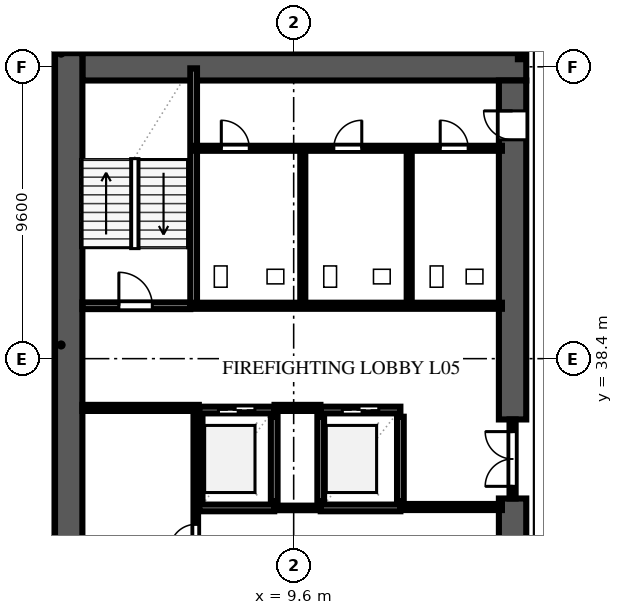
"""IFC4 building model, lengths in metres.
Left out: names, types, materials, properties, quantities, classifications, styles, units other than length and angle.
Written with IfcOpenShell. Run it as: python <this file> out.ifc"""

import sys

from ifc_helpers import new_model, si_unit, direction, frame, frame_2d, origin, place, context, subcontext, project, spatial, rectangle, extrude, element, fill, save


model = new_model("IFC4")
c1 = context("Model", 3, precision=1e-05, world=origin(), true_north=direction((0.0, 1.0)))
c2 = subcontext(c1, "Body", "Model", "MODEL_VIEW")
j1 = project(units=[si_unit("LENGTHUNIT", "METRE"), si_unit("PLANEANGLEUNIT", "RADIAN")], contexts=[c1])
p1 = place(None, origin())
s1 = spatial("IfcSite", under=j1, at=p1, CompositionType="ELEMENT")
p2 = place(p1, origin())
s2 = spatial("IfcBuilding", under=s1, at=p2, CompositionType="ELEMENT")
p3 = place(p2, frame((0.0, 0.0, 24.2)))
s3 = spatial("IfcBuildingStorey", under=s2, at=p3, CompositionType="ELEMENT", Elevation=24.2)
p4 = place(p3, frame((2.65, 48.0, 0.0), z_axis=(0.0, 0.0, 1.0), x_axis=(1.0, 0.0, 0.0)))
e1 = element("IfcWall", 1, at=p4, inside=s3, PredefinedType="SHEAR", context=c2, shape_type="SweptSolid", body=[
    extrude(rectangle(XDim=14.6, YDim=0.9, at=frame_2d((7.3, 0.0))), origin(), (0.0, 0.0, 1.0), 3.54),
])
p5 = place(p3, frame((2.2, 9.15, 0.0), z_axis=(0.0, 0.0, 1.0), x_axis=(0.0, 1.0, 0.0)))
e2 = element("IfcWall", 2, at=p5, inside=s3, PredefinedType="SHEAR", context=c2, shape_type="SweptSolid", body=[
    extrude(rectangle(XDim=39.3, YDim=0.9, at=frame_2d((19.65, 0.0))), origin(), (0.0, 0.0, 1.0), 3.54),
])
p6 = place(p3, frame((16.8, 26.0, 0.0), z_axis=(0.0, 0.0, 1.0), x_axis=(0.0, 1.0, 0.0)))
e3 = element("IfcWall", 3, at=p6, inside=s3, PredefinedType="SHEAR", context=c2, shape_type="SweptSolid", body=[
    extrude(rectangle(XDim=7.8, YDim=0.9, at=frame_2d((3.9, 0.0))), origin(), (0.0, 0.0, 1.0), 3.54),
])
p7 = place(p3, frame((16.8, 36.4, 0.0), z_axis=(0.0, 0.0, 1.0), x_axis=(0.0, 1.0, 0.0)))
e4 = element("IfcWall", 4, at=p7, inside=s3, PredefinedType="SHEAR", context=c2, shape_type="SweptSolid", body=[
    extrude(rectangle(XDim=11.15, YDim=0.9, at=frame_2d((5.575, 0.0))), origin(), (0.0, 0.0, 1.0), 3.54),
])
p8 = place(p7, frame((9.2, 0.0, 0.0)))
e5 = element("IfcOpeningElement", 5, at=p8, cuts=e4, PredefinedType="OPENING", context=c2, shape_type="SweptSolid", body=[
    extrude(rectangle(XDim=0.95, YDim=2.15, at=frame_2d((0.475, 1.075))), frame((0.0, 0.462, 0.0), z_axis=(0.0, -1.0, 0.0), x_axis=(1.0, 0.0, 0.0)), (0.0, 0.0, 1.0), 0.924),
])
p9 = place(p3, frame((2.65, 40.14, 0.0), z_axis=(0.0, 0.0, 1.0), x_axis=(1.0, 0.0, 0.0)))
e6 = element("IfcWall", 6, at=p9, inside=s3, PredefinedType="SOLIDWALL", context=c2, shape_type="SweptSolid", body=[
    extrude(rectangle(XDim=3.55, YDim=0.22, at=frame_2d((1.775, 0.0))), origin(), (0.0, 0.0, 1.0), 3.54),
])
p10 = place(p9, frame((1.2, 0.0, 0.0)))
e7 = element("IfcOpeningElement", 7, at=p10, cuts=e6, PredefinedType="OPENING", context=c2, shape_type="SweptSolid", body=[
    extrude(rectangle(XDim=1.1, YDim=2.2, at=frame_2d((0.55, 1.1))), frame((0.0, 0.122, 0.0), z_axis=(0.0, -1.0, 0.0), x_axis=(1.0, 0.0, 0.0)), (0.0, 0.0, 1.0), 0.244),
])
p11 = place(p3, frame((6.31, 40.14, 0.0), z_axis=(0.0, 0.0, 1.0), x_axis=(0.0, 1.0, 0.0)))
e8 = element("IfcWall", 8, at=p11, inside=s3, PredefinedType="SOLIDWALL", context=c2, shape_type="SweptSolid", body=[
    extrude(rectangle(XDim=7.81, YDim=0.22, at=frame_2d((3.905, 0.0))), origin(), (0.0, 0.0, 1.0), 3.54),
])
for number, where, z_axis, x_axis in (
    (9, (6.49, 33.71, 0.0), (0.0, 0.0, 1.0), (0.0, 1.0, 0.0)),
    (10, (8.96, 33.71, 0.0), (0.0, 0.0, 1.0), (0.0, 1.0, 0.0)),
):
    element("IfcWall", number, at=place(p3, frame(where, z_axis=z_axis, x_axis=x_axis)), inside=s3, PredefinedType="SOLIDWALL", context=c2, shape_type="SweptSolid", body=[
        extrude(rectangle(XDim=2.78, YDim=0.22, at=frame_2d((1.39, 0.0))), origin(), (0.0, 0.0, 1.0), 3.54),
    ])
p12 = place(p3, frame((6.49, 33.49, 0.0), z_axis=(0.0, 0.0, 1.0), x_axis=(1.0, 0.0, 0.0)))
e11 = element("IfcWall", 11, at=p12, inside=s3, PredefinedType="SOLIDWALL", context=c2, shape_type="SweptSolid", body=[
    extrude(rectangle(XDim=2.47, YDim=0.22, at=frame_2d((1.235, 0.0))), origin(), (0.0, 0.0, 1.0), 3.54),
])
p13 = place(p3, frame((6.49, 36.71, 0.0), z_axis=(0.0, 0.0, 1.0), x_axis=(1.0, 0.0, 0.0)))
e12 = element("IfcWall", 12, at=p13, inside=s3, PredefinedType="SOLIDWALL", context=c2, shape_type="SweptSolid", body=[
    extrude(rectangle(XDim=2.47, YDim=0.22, at=frame_2d((1.235, 0.0))), origin(), (0.0, 0.0, 1.0), 3.54),
])
p14 = place(p13, frame((0.635, 0.0, 0.0)))
e13 = element("IfcOpeningElement", 13, at=p14, cuts=e12, PredefinedType="OPENING", context=c2, shape_type="SweptSolid", body=[
    extrude(rectangle(XDim=1.2, YDim=2.2, at=frame_2d((0.6, 1.1))), frame((0.0, 0.122, 0.0), z_axis=(0.0, -1.0, 0.0), x_axis=(1.0, 0.0, 0.0)), (0.0, 0.0, 1.0), 0.244),
])
for number, where, z_axis, x_axis in (
    (14, (10.49, 33.71, 0.0), (0.0, 0.0, 1.0), (0.0, 1.0, 0.0)),
    (15, (13.11, 33.71, 0.0), (0.0, 0.0, 1.0), (0.0, 1.0, 0.0)),
):
    element("IfcWall", number, at=place(p3, frame(where, z_axis=z_axis, x_axis=x_axis)), inside=s3, PredefinedType="SOLIDWALL", context=c2, shape_type="SweptSolid", body=[
        extrude(rectangle(XDim=2.78, YDim=0.22, at=frame_2d((1.39, 0.0))), origin(), (0.0, 0.0, 1.0), 3.54),
    ])
p15 = place(p3, frame((10.49, 33.49, 0.0), z_axis=(0.0, 0.0, 1.0), x_axis=(1.0, 0.0, 0.0)))
e16 = element("IfcWall", 16, at=p15, inside=s3, PredefinedType="SOLIDWALL", context=c2, shape_type="SweptSolid", body=[
    extrude(rectangle(XDim=2.62, YDim=0.22, at=frame_2d((1.31, 0.0))), origin(), (0.0, 0.0, 1.0), 3.54),
])
p16 = place(p3, frame((10.49, 36.71, 0.0), z_axis=(0.0, 0.0, 1.0), x_axis=(1.0, 0.0, 0.0)))
e17 = element("IfcWall", 17, at=p16, inside=s3, PredefinedType="SOLIDWALL", context=c2, shape_type="SweptSolid", body=[
    extrude(rectangle(XDim=2.62, YDim=0.22, at=frame_2d((1.31, 0.0))), origin(), (0.0, 0.0, 1.0), 3.54),
])
p17 = place(p16, frame((0.71, 0.0, 0.0)))
e18 = element("IfcOpeningElement", 18, at=p17, cuts=e17, PredefinedType="OPENING", context=c2, shape_type="SweptSolid", body=[
    extrude(rectangle(XDim=1.2, YDim=2.2, at=frame_2d((0.6, 1.1))), frame((0.0, 0.122, 0.0), z_axis=(0.0, -1.0, 0.0), x_axis=(1.0, 0.0, 0.0)), (0.0, 0.0, 1.0), 0.244),
])
p18 = place(p3, frame((2.65, 36.78, 0.0), z_axis=(0.0, 0.0, 1.0), x_axis=(1.0, 0.0, 0.0)))
e19 = element("IfcWall", 19, at=p18, inside=s3, PredefinedType="SOLIDWALL", context=c2, shape_type="SweptSolid", body=[
    extrude(rectangle(XDim=3.83, YDim=0.2, at=frame_2d((1.915, 0.0))), origin(), (0.0, 0.0, 1.0), 3.54),
])
p19 = place(p3, frame((8.97, 36.78, 0.0), z_axis=(0.0, 0.0, 1.0), x_axis=(1.0, 0.0, 0.0)))
e20 = element("IfcWall", 20, at=p19, inside=s3, PredefinedType="SOLIDWALL", context=c2, shape_type="SweptSolid", body=[
    extrude(rectangle(XDim=1.51, YDim=0.2, at=frame_2d((0.755, 0.0))), origin(), (0.0, 0.0, 1.0), 3.54),
])
p20 = place(p3, frame((13.12, 33.52, 0.0), z_axis=(0.0, 0.0, 1.0), x_axis=(1.0, 0.0, 0.0)))
e21 = element("IfcWall", 21, at=p20, inside=s3, PredefinedType="SOLIDWALL", context=c2, shape_type="SweptSolid", body=[
    extrude(rectangle(XDim=3.33, YDim=0.2, at=frame_2d((1.665, 0.0))), origin(), (0.0, 0.0, 1.0), 3.54),
])
p21 = place(p3, frame((6.32, 40.14, 0.0), z_axis=(0.0, 0.0, 1.0), x_axis=(1.0, 0.0, 0.0)))
e22 = element("IfcWall", 22, at=p21, inside=s3, PredefinedType="SOLIDWALL", context=c2, shape_type="SweptSolid", body=[
    extrude(rectangle(XDim=10.13, YDim=0.2, at=frame_2d((5.065, 0.0))), origin(), (0.0, 0.0, 1.0), 3.54),
])
p22 = place(p3, frame((16.8, 33.8, 0.0), z_axis=(0.0, 0.0, 1.0), x_axis=(0.0, 1.0, 0.0)))
e23 = element("IfcWall", 23, at=p22, inside=s3, PredefinedType="SOLIDWALL", context=c2, shape_type="SweptSolid", body=[
    extrude(rectangle(XDim=2.6, YDim=0.2, at=frame_2d((1.3, 0.0))), origin(), (0.0, 0.0, 1.0), 3.54),
])
p23 = place(p22, frame((0.4, 0.0, 0.0)))
e24 = element("IfcOpeningElement", 24, at=p23, cuts=e23, PredefinedType="OPENING", context=c2, shape_type="SweptSolid", body=[
    extrude(rectangle(XDim=1.8, YDim=2.2, at=frame_2d((0.9, 1.1))), frame((0.0, 0.112, 0.0), z_axis=(0.0, -1.0, 0.0), x_axis=(1.0, 0.0, 0.0)), (0.0, 0.0, 1.0), 0.224),
])
p24 = place(p3, frame((8.965, 33.49, 0.0), z_axis=(0.0, 0.0, 1.0), x_axis=(1.0, 0.0, 0.0)))
e25 = element("IfcWall", 25, at=p24, inside=s3, PredefinedType="PARTITIONING", context=c2, shape_type="SweptSolid", body=[
    extrude(rectangle(XDim=1.52, YDim=0.15, at=frame_2d((0.76, 0.0))), origin(), (0.0, 0.0, 1.0), 3.54),
])
p25 = place(p3, frame((6.38, 17.8, 0.0), z_axis=(0.0, 0.0, 1.0), x_axis=(0.0, 1.0, 0.0)))
e26 = element("IfcWall", 26, at=p25, inside=s3, PredefinedType="PARTITIONING", context=c2, shape_type="SweptSolid", body=[
    extrude(rectangle(XDim=18.98, YDim=0.15, at=frame_2d((9.49, 0.0))), origin(), (0.0, 0.0, 1.0), 3.54),
])
p26 = place(p25, frame((14.3, 0.0, 0.0)))
e27 = element("IfcOpeningElement", 27, at=p26, cuts=e26, PredefinedType="OPENING", context=c2, shape_type="SweptSolid", body=[
    extrude(rectangle(XDim=0.85, YDim=2.1, at=frame_2d((0.425, 1.05))), frame((0.0, 0.087, 0.0), z_axis=(0.0, -1.0, 0.0), x_axis=(1.0, 0.0, 0.0)), (0.0, 0.0, 1.0), 0.174),
])
p27 = place(p3, frame((6.32, 45.32, 0.0), z_axis=(0.0, 0.0, 1.0), x_axis=(1.0, 0.0, 0.0)))
e28 = element("IfcWall", 28, at=p27, inside=s3, PredefinedType="PLUMBINGWALL", context=c2, shape_type="SweptSolid", body=[
    extrude(rectangle(XDim=10.13, YDim=0.165, at=frame_2d((5.065, 0.0))), origin(), (0.0, 0.0, 1.0), 3.54),
])
p28 = place(p27, frame((0.9, 0.0, 0.0)))
e29 = element("IfcOpeningElement", 29, at=p28, cuts=e28, PredefinedType="OPENING", context=c2, shape_type="SweptSolid", body=[
    extrude(rectangle(XDim=0.92, YDim=2.15, at=frame_2d((0.46, 1.075))), frame((0.0, 0.094, 0.0), z_axis=(0.0, -1.0, 0.0), x_axis=(1.0, 0.0, 0.0)), (0.0, 0.0, 1.0), 0.189),
])
p29 = place(p27, frame((4.6, 0.0, 0.0)))
e30 = element("IfcOpeningElement", 30, at=p29, cuts=e28, PredefinedType="OPENING", context=c2, shape_type="SweptSolid", body=[
    extrude(rectangle(XDim=0.92, YDim=2.15, at=frame_2d((0.46, 1.075))), frame((0.0, 0.094, 0.0), z_axis=(0.0, -1.0, 0.0), x_axis=(1.0, 0.0, 0.0)), (0.0, 0.0, 1.0), 0.189),
])
p30 = place(p27, frame((8.1, 0.0, 0.0)))
e31 = element("IfcOpeningElement", 31, at=p30, cuts=e28, PredefinedType="OPENING", context=c2, shape_type="SweptSolid", body=[
    extrude(rectangle(XDim=0.92, YDim=2.15, at=frame_2d((0.46, 1.075))), frame((0.0, 0.094, 0.0), z_axis=(0.0, -1.0, 0.0), x_axis=(1.0, 0.0, 0.0)), (0.0, 0.0, 1.0), 0.189),
])
for number, where, z_axis, x_axis in (
    (32, (9.9, 40.4, 0.0), (0.0, 0.0, 1.0), (0.0, 1.0, 0.0)),
    (33, (13.4, 40.4, 0.0), (0.0, 0.0, 1.0), (0.0, 1.0, 0.0)),
):
    element("IfcWall", number, at=place(p3, frame(where, z_axis=z_axis, x_axis=x_axis)), inside=s3, PredefinedType="PLUMBINGWALL", context=c2, shape_type="SweptSolid", body=[
        extrude(rectangle(XDim=4.92, YDim=0.165, at=frame_2d((2.46, 0.0))), origin(), (0.0, 0.0, 1.0), 3.54),
    ])
p31 = place(p3, frame((0.85, 48.0, 0.0), z_axis=(0.0, 0.0, 1.0), x_axis=(1.0, 0.0, 0.0)))
e34 = element("IfcWall", 34, at=p31, inside=s3, PredefinedType="SOLIDWALL", context=c2, shape_type="SweptSolid", body=[
    extrude(rectangle(XDim=0.895, YDim=0.2, at=frame_2d((0.448, 0.0))), origin(), (0.0, 0.0, 1.0), 3.54),
])
p32 = place(p3, frame((17.05, 48.25, 0.0), z_axis=(0.0, 0.0, 1.0), x_axis=(0.0, 1.0, 0.0)))
e35 = element("IfcWall", 35, at=p32, inside=s3, PredefinedType="PARTITIONING", context=c2, shape_type="SweptSolid", body=[
    extrude(rectangle(XDim=18.73, YDim=0.15, at=frame_2d((9.365, 0.0))), origin(), (0.0, 0.0, 1.0), 3.54),
])
p33 = place(p32, frame((3.4, 0.0, 0.0)))
e36 = element("IfcOpeningElement", 36, at=p33, cuts=e35, PredefinedType="OPENING", context=c2, shape_type="SweptSolid", body=[
    extrude(rectangle(XDim=0.95, YDim=2.15, at=frame_2d((0.475, 1.075))), frame((0.0, 0.087, 0.0), z_axis=(0.0, -1.0, 0.0), x_axis=(1.0, 0.0, 0.0)), (0.0, 0.0, 1.0), 0.174),
])
p34 = place(p10, origin())
e37 = element("IfcDoor", 37, at=p34, inside=s3, OperationType="SINGLE_SWING_LEFT", PredefinedType="DOOR", context=c2, shape_type="SweptSolid", body=[
    extrude(rectangle(XDim=1.1, YDim=2.2, at=frame_2d((0.55, 1.1))), frame((0.0, 0.025, 0.0), z_axis=(0.0, -1.0, 0.0), x_axis=(1.0, 0.0, 0.0)), (0.0, 0.0, 1.0), 0.05),
])
fill(e7, e37)
p35 = place(p14, origin())
e38 = element("IfcDoor", 38, at=p35, inside=s3, OperationType="DOUBLE_DOOR_SLIDING", PredefinedType="DOOR", context=c2, shape_type="SweptSolid", body=[
    extrude(rectangle(XDim=1.2, YDim=2.2, at=frame_2d((0.6, 1.1))), frame((0.0, 0.025, 0.0), z_axis=(0.0, -1.0, 0.0), x_axis=(1.0, 0.0, 0.0)), (0.0, 0.0, 1.0), 0.05),
])
fill(e13, e38)
p36 = place(p17, origin())
e39 = element("IfcDoor", 39, at=p36, inside=s3, OperationType="DOUBLE_DOOR_SLIDING", PredefinedType="DOOR", context=c2, shape_type="SweptSolid", body=[
    extrude(rectangle(XDim=1.2, YDim=2.2, at=frame_2d((0.6, 1.1))), frame((0.0, 0.025, 0.0), z_axis=(0.0, -1.0, 0.0), x_axis=(1.0, 0.0, 0.0)), (0.0, 0.0, 1.0), 0.05),
])
fill(e18, e39)
p37 = place(p8, origin())
e40 = element("IfcDoor", 40, at=p37, inside=s3, OperationType="SINGLE_SWING_RIGHT", PredefinedType="DOOR", context=c2, shape_type="SweptSolid", body=[
    extrude(rectangle(XDim=0.95, YDim=2.15, at=frame_2d((0.475, 1.075))), frame((0.0, 0.025, 0.0), z_axis=(0.0, -1.0, 0.0), x_axis=(1.0, 0.0, 0.0)), (0.0, 0.0, 1.0), 0.05),
])
fill(e5, e40)
p38 = place(p23, origin())
e41 = element("IfcDoor", 41, at=p38, inside=s3, OperationType="DOUBLE_DOOR_SINGLE_SWING", PredefinedType="DOOR", context=c2, shape_type="SweptSolid", body=[
    extrude(rectangle(XDim=1.8, YDim=2.2, at=frame_2d((0.9, 1.1))), frame((0.0, 0.025, 0.0), z_axis=(0.0, -1.0, 0.0), x_axis=(1.0, 0.0, 0.0)), (0.0, 0.0, 1.0), 0.05),
])
fill(e24, e41)
p39 = place(p26, origin())
e42 = element("IfcDoor", 42, at=p39, inside=s3, OperationType="SINGLE_SWING_LEFT", PredefinedType="DOOR", context=c2, shape_type="SweptSolid", body=[
    extrude(rectangle(XDim=0.85, YDim=2.1, at=frame_2d((0.425, 1.05))), frame((0.0, 0.025, 0.0), z_axis=(0.0, -1.0, 0.0), x_axis=(1.0, 0.0, 0.0)), (0.0, 0.0, 1.0), 0.05),
])
fill(e27, e42)
p40 = place(p28, origin())
e43 = element("IfcDoor", 43, at=p40, inside=s3, OperationType="SINGLE_SWING_LEFT", PredefinedType="DOOR", context=c2, shape_type="SweptSolid", body=[
    extrude(rectangle(XDim=0.92, YDim=2.15, at=frame_2d((0.46, 1.075))), frame((0.0, 0.025, 0.0), z_axis=(0.0, -1.0, 0.0), x_axis=(1.0, 0.0, 0.0)), (0.0, 0.0, 1.0), 0.05),
])
fill(e29, e43)
p41 = place(p29, origin())
e44 = element("IfcDoor", 44, at=p41, inside=s3, OperationType="SINGLE_SWING_RIGHT", PredefinedType="DOOR", context=c2, shape_type="SweptSolid", body=[
    extrude(rectangle(XDim=0.92, YDim=2.15, at=frame_2d((0.46, 1.075))), frame((0.0, 0.025, 0.0), z_axis=(0.0, -1.0, 0.0), x_axis=(1.0, 0.0, 0.0)), (0.0, 0.0, 1.0), 0.05),
])
fill(e30, e44)
p42 = place(p30, origin())
e45 = element("IfcDoor", 45, at=p42, inside=s3, OperationType="SINGLE_SWING_LEFT", PredefinedType="DOOR", context=c2, shape_type="SweptSolid", body=[
    extrude(rectangle(XDim=0.92, YDim=2.15, at=frame_2d((0.46, 1.075))), frame((0.0, 0.025, 0.0), z_axis=(0.0, -1.0, 0.0), x_axis=(1.0, 0.0, 0.0)), (0.0, 0.0, 1.0), 0.05),
])
fill(e31, e45)
save(model, sys.argv[1])
